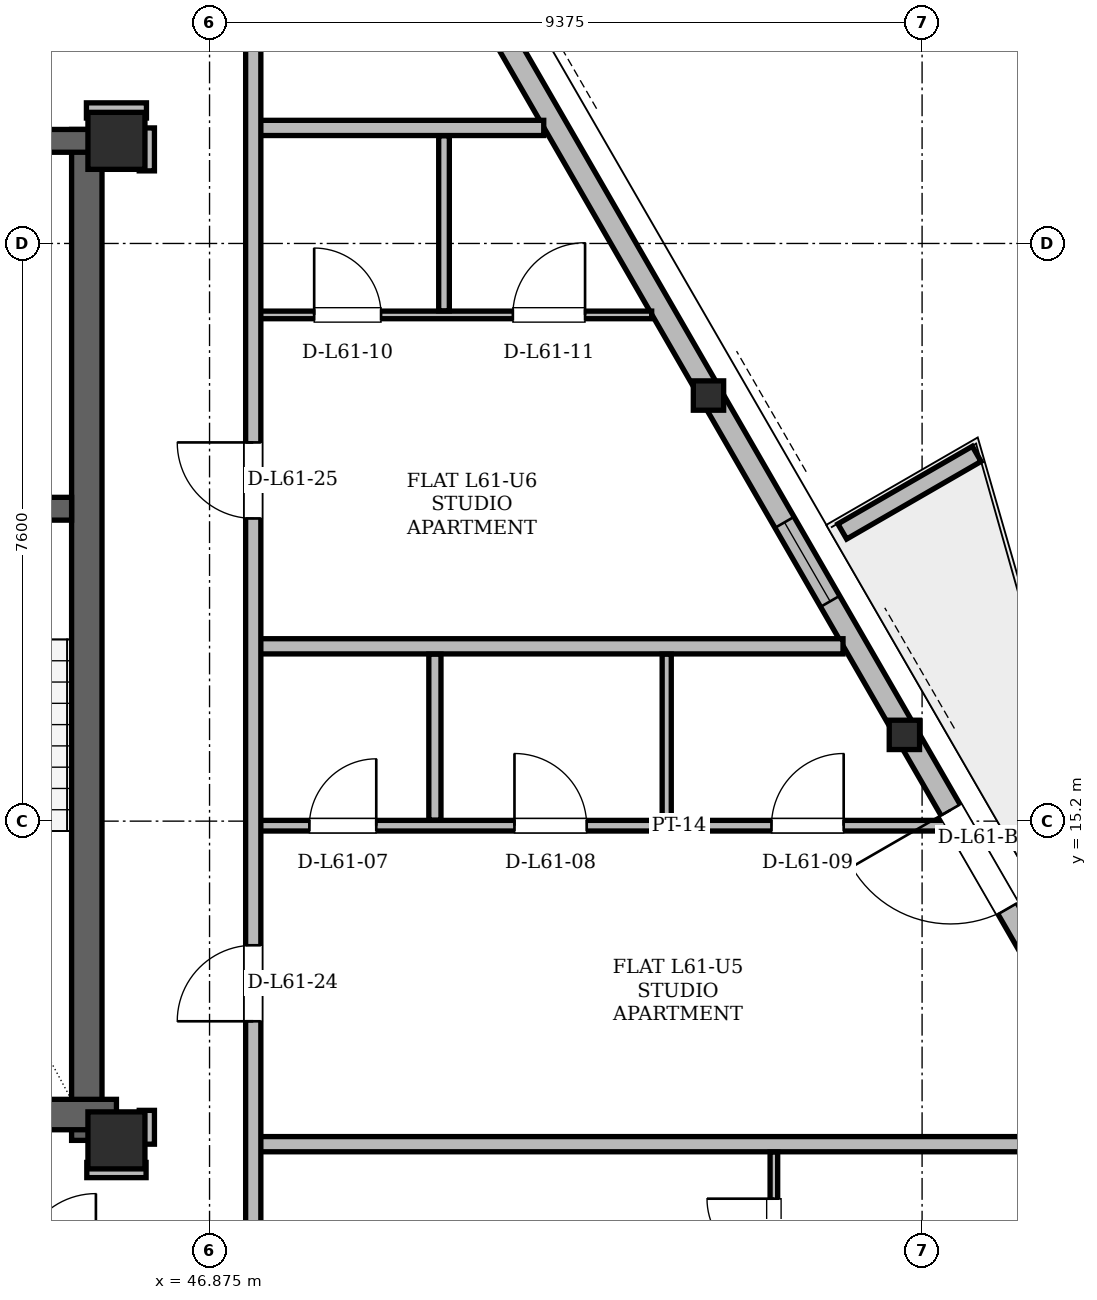
"""IFC4 building model, lengths in metres.
Left out: names, types, materials, properties, quantities, classifications, styles, units other than length and angle.
Written with IfcOpenShell. Run it as: python <this file> out.ifc"""

import sys

from ifc_helpers import new_model, si_unit, direction, frame, frame_2d, origin, origin_2d, place, context, subcontext, project, spatial, polyline, rectangle, hollow_rectangle, i_section, outline, extrude, element, fill, save


model = new_model("IFC4")
c1 = context("Model", 3, precision=1e-05, world=origin(), true_north=direction((0.0, 1.0)))
c2 = subcontext(c1, "Body", "Model", "MODEL_VIEW")
j1 = project(units=[si_unit("LENGTHUNIT", "METRE"), si_unit("PLANEANGLEUNIT", "RADIAN")], contexts=[c1])
p1 = place(None, origin())
s1 = spatial("IfcSite", under=j1, at=p1, CompositionType="ELEMENT")
p2 = place(p1, origin())
s2 = spatial("IfcBuilding", under=s1, at=p2, CompositionType="ELEMENT")
p3 = place(p2, frame((0.0, 0.0, 230.7)))
s3 = spatial("IfcBuildingStorey", under=s2, at=p3, CompositionType="ELEMENT", Elevation=230.7)
for number, where, z_axis, x_axis in (
    (1, (45.65, 11.0, 0.0), (0.0, 0.0, 1.0), (1.0, 0.0, 0.0)),
    (2, (45.65, 24.15, 0.0), (0.0, 0.0, 1.0), (1.0, 0.0, 0.0)),
):
    element("IfcColumn", number, at=place(p3, frame(where, z_axis=z_axis, x_axis=x_axis)), inside=s3, PredefinedType="COLUMN", context=c2, shape_type="SweptSolid", body=[
        extrude(hollow_rectangle(XDim=0.75, YDim=0.75, WallThickness=0.06, at=origin_2d()), origin(), (0.0, 0.0, 1.0), 3.6),
    ])
p4 = place(p3, frame((56.041, 16.359, 0.005), z_axis=(-0.012983894256, -0.013255808272, 0.999827836198), x_axis=(0.714395955768, -0.699741679752, 0.0)))
e3 = element("IfcColumn", 3, at=p4, inside=s3, PredefinedType="COLUMN", context=c2, shape_type="SweptSolid", body=[
    extrude(i_section(OverallWidth=0.399, OverallDepth=0.386, WebThickness=0.021, FlangeThickness=0.033, at=origin_2d()), origin(), (0.0, 0.0, 1.0), 3.592),
])
p5 = place(p3, frame((53.465, 20.82, 0.005), z_axis=(-0.01407165098, -0.011488449351, 0.999834988471), x_axis=(0.632422318611, -0.774623786701, 0.0)))
e4 = element("IfcColumn", 4, at=p5, inside=s3, PredefinedType="COLUMN", context=c2, shape_type="SweptSolid", body=[
    extrude(i_section(OverallWidth=0.399, OverallDepth=0.386, WebThickness=0.021, FlangeThickness=0.033, at=origin_2d()), origin(), (0.0, 0.0, 1.0), 3.591),
])
p6 = place(p3, frame((45.26, 11.0, 0.0), z_axis=(0.0, 0.0, 1.0), x_axis=(0.0, 1.0, 0.0)))
e5 = element("IfcWall", 5, at=p6, inside=s3, PredefinedType="SHEAR", context=c2, shape_type="SweptSolid", body=[
    extrude(rectangle(XDim=13.3, YDim=0.4, at=frame_2d((6.65, 0.0))), origin(), (0.0, 0.0, 1.0), 3.38),
])
p7 = place(p3, frame((38.55, 11.34, 0.0), z_axis=(0.0, 0.0, 1.0), x_axis=(1.0, 0.0, 0.0)))
e6 = element("IfcWall", 6, at=p7, inside=s3, PredefinedType="SHEAR", context=c2, shape_type="SweptSolid", body=[
    extrude(rectangle(XDim=7.1, YDim=0.4, at=frame_2d((3.55, 0.0))), origin(), (0.0, 0.0, 1.0), 3.38),
])
p8 = place(p3, frame((29.65, 24.15, 0.0), z_axis=(0.0, 0.0, 1.0), x_axis=(1.0, 0.0, 0.0)))
e7 = element("IfcWall", 7, at=p8, inside=s3, PredefinedType="SHEAR", context=c2, shape_type="SweptSolid", body=[
    extrude(rectangle(XDim=15.7, YDim=0.3, at=frame_2d((7.85, 0.0))), origin(), (0.0, 0.0, 1.0), 3.38),
])
p9 = place(p8, frame((1.7, 0.0, 0.0)))
e8 = element("IfcOpeningElement", 8, at=p9, cuts=e7, PredefinedType="OPENING", context=c2, shape_type="SweptSolid", body=[
    extrude(rectangle(XDim=1.2, YDim=2.2, at=frame_2d((0.6, 1.1))), frame((0.0, 0.15, 0.0), z_axis=(0.0, -1.0, 0.0), x_axis=(1.0, 0.0, 0.0)), (0.0, 0.0, 1.0), 0.3),
])
p10 = place(p8, frame((12.8, 0.0, 0.0)))
e9 = element("IfcOpeningElement", 9, at=p10, cuts=e7, PredefinedType="OPENING", context=c2, shape_type="SweptSolid", body=[
    extrude(rectangle(XDim=1.2, YDim=2.2, at=frame_2d((0.6, 1.1))), frame((0.0, 0.15, 0.0), z_axis=(0.0, -1.0, 0.0), x_axis=(1.0, 0.0, 0.0)), (0.0, 0.0, 1.0), 0.3),
])
p11 = place(p8, frame((6.55, 0.0, 0.0)))
e10 = element("IfcOpeningElement", 10, at=p11, cuts=e7, PredefinedType="OPENING", context=c2, shape_type="SweptSolid", body=[
    extrude(rectangle(XDim=0.9, YDim=2.05, at=frame_2d((0.45, 1.025))), frame((0.0, 0.15, 0.0), z_axis=(0.0, -1.0, 0.0), x_axis=(1.0, 0.0, 0.0)), (0.0, 0.0, 1.0), 0.3),
])
p12 = place(p8, frame((8.45, 0.0, 0.0)))
e11 = element("IfcOpeningElement", 11, at=p12, cuts=e7, PredefinedType="OPENING", context=c2, shape_type="SweptSolid", body=[
    extrude(rectangle(XDim=0.9, YDim=2.05, at=frame_2d((0.45, 1.025))), frame((0.0, 0.15, 0.0), z_axis=(0.0, -1.0, 0.0), x_axis=(1.0, 0.0, 0.0)), (0.0, 0.0, 1.0), 0.3),
])
p13 = place(p3, frame((41.05, 19.31, 0.0), z_axis=(0.0, 0.0, 1.0), x_axis=(1.0, 0.0, 0.0)))
e12 = element("IfcWall", 12, at=p13, inside=s3, PredefinedType="SHEAR", context=c2, shape_type="SweptSolid", body=[
    extrude(rectangle(XDim=4.01, YDim=0.3, at=frame_2d((2.005, 0.0))), origin(), (0.0, 0.0, 1.0), 3.38),
])
p14 = place(p13, frame((1.6, 0.0, 0.0)))
e13 = element("IfcOpeningElement", 13, at=p14, cuts=e12, PredefinedType="OPENING", context=c2, shape_type="SweptSolid", body=[
    extrude(rectangle(XDim=1.4, YDim=2.2, at=frame_2d((0.7, 1.1))), frame((0.0, 0.15, 0.0), z_axis=(0.0, -1.0, 0.0), x_axis=(1.0, 0.0, 0.0)), (0.0, 0.0, 1.0), 0.3),
])
p15 = place(p3, frame((55.898, 5.914, 0.0), z_axis=(0.0, 0.0, 1.0), x_axis=(0.49997579017, 0.866039380885, 0.0)))
e14 = element("IfcWall", 14, at=p15, inside=s3, PredefinedType="SOLIDWALL", context=c2, shape_type="SweptSolid", body=[
    extrude(rectangle(XDim=6.173, YDim=0.29, at=frame_2d((3.086, 0.0))), origin(), (0.0, 0.0, 1.0), 2.677),
])
p16 = place(p3, frame((58.984, 11.26, 0.0), z_axis=(0.0, 0.0, 1.0), x_axis=(-0.50000331183, 0.86602349169, 0.0)))
e15 = element("IfcWall", 15, at=p16, inside=s3, PredefinedType="SOLIDWALL", context=c2, shape_type="SweptSolid", body=[
    extrude(rectangle(XDim=36.795, YDim=0.29, at=frame_2d((18.397, 0.0))), origin(), (0.0, 0.0, 1.0), 2.677),
])
p17 = place(p16, frame((3.219, 0.0, 0.0)))
e16 = element("IfcOpeningElement", 16, at=p17, cuts=e15, PredefinedType="OPENING", context=c2, shape_type="SweptSolid", body=[
    extrude(rectangle(XDim=1.5, YDim=2.2, at=frame_2d((0.75, 1.1))), frame((0.0, 0.145, 0.0), z_axis=(0.0, -1.0, 0.0), x_axis=(1.0, 0.0, 0.0)), (0.0, 0.0, 1.0), 0.29),
])
p18 = place(p16, frame((27.151, 0.0, 0.0)))
e17 = element("IfcOpeningElement", 17, at=p18, cuts=e15, PredefinedType="OPENING", context=c2, shape_type="SweptSolid", body=[
    extrude(rectangle(XDim=1.3, YDim=2.2, at=frame_2d((0.65, 1.1))), frame((0.0, 0.145, 0.0), z_axis=(0.0, -1.0, 0.0), x_axis=(1.0, 0.0, 0.0)), (0.0, 0.0, 1.0), 0.29),
])
p19 = place(p16, frame((1.169, 0.0, 0.85)))
e18 = element("IfcOpeningElement", 18, at=p19, cuts=e15, PredefinedType="OPENING", context=c2, shape_type="SweptSolid", body=[
    extrude(rectangle(XDim=1.2, YDim=1.48, at=frame_2d((0.6, 0.74))), frame((0.0, 0.145, 0.0), z_axis=(0.0, -1.0, 0.0), x_axis=(1.0, 0.0, 0.0)), (0.0, 0.0, 1.0), 0.29),
])
p20 = place(p16, frame((7.888, 0.0, 0.85)))
e19 = element("IfcOpeningElement", 19, at=p20, cuts=e15, PredefinedType="OPENING", context=c2, shape_type="SweptSolid", body=[
    extrude(rectangle(XDim=1.2, YDim=1.48, at=frame_2d((0.6, 0.74))), frame((0.0, 0.145, 0.0), z_axis=(0.0, -1.0, 0.0), x_axis=(1.0, 0.0, 0.0)), (0.0, 0.0, 1.0), 0.29),
])
p21 = place(p16, frame((32.464, 0.0, 0.85)))
e20 = element("IfcOpeningElement", 20, at=p21, cuts=e15, PredefinedType="OPENING", context=c2, shape_type="SweptSolid", body=[
    extrude(rectangle(XDim=1.2, YDim=1.48, at=frame_2d((0.6, 0.74))), frame((0.0, 0.145, 0.0), z_axis=(0.0, -1.0, 0.0), x_axis=(1.0, 0.0, 0.0)), (0.0, 0.0, 1.0), 0.29),
])
p22 = place(p16, frame((16.904, 0.0, 0.85)))
e21 = element("IfcOpeningElement", 21, at=p22, cuts=e15, PredefinedType="OPENING", context=c2, shape_type="SweptSolid", body=[
    extrude(rectangle(XDim=2.0, YDim=1.717, at=frame_2d((1.0, 0.858))), frame((0.0, 0.145, 0.0), z_axis=(0.0, -1.0, 0.0), x_axis=(1.0, 0.0, 0.0)), (0.0, 0.0, 1.0), 0.29),
])
p23 = place(p16, frame((23.036, 0.0, 0.85)))
e22 = element("IfcOpeningElement", 22, at=p23, cuts=e15, PredefinedType="OPENING", context=c2, shape_type="SweptSolid", body=[
    extrude(rectangle(XDim=1.4, YDim=1.6, at=frame_2d((0.7, 0.8))), frame((0.0, 0.145, 0.0), z_axis=(0.0, -1.0, 0.0), x_axis=(1.0, 0.0, 0.0)), (0.0, 0.0, 1.0), 0.29),
])
p24 = place(p3, frame((55.2, 19.011, 0.0), z_axis=(0.0, 0.0, 1.0), x_axis=(0.866042246008, 0.499970827278, 0.0)))
e23 = element("IfcWall", 23, at=p24, inside=s3, PredefinedType="PARAPET", context=c2, shape_type="SweptSolid", body=[
    extrude(outline(polyline([(0.0, 0.0), (2.042, 0.0), (2.042, 1.1), (0.0, 1.32), (0.0, 0.0)])), frame((0.0, 0.115, 0.0), z_axis=(0.0, -1.0, 0.0), x_axis=(1.0, 0.0, 0.0)), (0.0, 0.0, 1.0), 0.23),
])
p25 = place(p3, frame((45.26, 10.61, 0.0), z_axis=(0.0, 0.0, 1.0), x_axis=(1.0, 0.0, 0.0)))
e24 = element("IfcWall", 24, at=p25, inside=s3, PredefinedType="PARTITIONING", context=c2, shape_type="SweptSolid", body=[
    extrude(rectangle(XDim=0.78, YDim=0.2, at=frame_2d((0.39, 0.0))), origin(), (0.0, 0.0, 1.0), 3.38),
])
p26 = place(p3, frame((47.45, 10.95, 0.0), z_axis=(0.0, 0.0, 1.0), x_axis=(1.0, 0.0, 0.0)))
e25 = element("IfcWall", 25, at=p26, inside=s3, PredefinedType="PARTITIONING", context=c2, shape_type="SweptSolid", body=[
    extrude(rectangle(XDim=11.148, YDim=0.2, at=frame_2d((5.574, 0.0))), origin(), (0.0, 0.0, 1.0), 2.913),
])
p27 = place(p3, frame((47.4, 15.14, 0.0), z_axis=(0.0, 0.0, 1.0), x_axis=(1.0, 0.0, 0.0)))
e26 = element("IfcWall", 26, at=p27, inside=s3, PredefinedType="PARTITIONING", context=c2, shape_type="SweptSolid", body=[
    extrude(rectangle(XDim=9.172, YDim=0.14, at=frame_2d((4.586, 0.0))), origin(), (0.0, 0.0, 1.0), 3.38),
])
p28 = place(p27, frame((0.789, 0.0, 0.0)))
e27 = element("IfcOpeningElement", 27, at=p28, cuts=e26, PredefinedType="OPENING", context=c2, shape_type="SweptSolid", body=[
    extrude(rectangle(XDim=0.88, YDim=2.08, at=frame_2d((0.44, 1.04))), frame((0.0, 0.07, 0.0), z_axis=(0.0, -1.0, 0.0), x_axis=(1.0, 0.0, 0.0)), (0.0, 0.0, 1.0), 0.14),
])
p29 = place(p27, frame((3.487, 0.0, 0.0)))
e28 = element("IfcOpeningElement", 28, at=p29, cuts=e26, PredefinedType="OPENING", context=c2, shape_type="SweptSolid", body=[
    extrude(rectangle(XDim=0.95, YDim=2.1, at=frame_2d((0.475, 1.05))), frame((0.0, 0.07, 0.0), z_axis=(0.0, -1.0, 0.0), x_axis=(1.0, 0.0, 0.0)), (0.0, 0.0, 1.0), 0.14),
])
p30 = place(p27, frame((6.868, 0.0, 0.0)))
e29 = element("IfcOpeningElement", 29, at=p30, cuts=e26, PredefinedType="OPENING", context=c2, shape_type="SweptSolid", body=[
    extrude(rectangle(XDim=0.95, YDim=2.1, at=frame_2d((0.475, 1.05))), frame((0.0, 0.07, 0.0), z_axis=(0.0, -1.0, 0.0), x_axis=(1.0, 0.0, 0.0)), (0.0, 0.0, 1.0), 0.14),
])
p31 = place(p3, frame((47.45, 17.5, 0.0), z_axis=(0.0, 0.0, 1.0), x_axis=(1.0, 0.0, 0.0)))
e30 = element("IfcWall", 30, at=p31, inside=s3, PredefinedType="PARTITIONING", context=c2, shape_type="SweptSolid", body=[
    extrude(rectangle(XDim=7.76, YDim=0.2, at=frame_2d((3.88, 0.0))), origin(), (0.0, 0.0, 1.0), 3.38),
])
p32 = place(p3, frame((47.4, 21.86, 0.0), z_axis=(0.0, 0.0, 1.0), x_axis=(1.0, 0.0, 0.0)))
e31 = element("IfcWall", 31, at=p32, inside=s3, PredefinedType="PARTITIONING", context=c2, shape_type="SweptSolid", body=[
    extrude(rectangle(XDim=5.292, YDim=0.1, at=frame_2d((2.646, 0.0))), origin(), (0.0, 0.0, 1.0), 3.38),
])
p33 = place(p32, frame((0.852, 0.0, 0.0)))
e32 = element("IfcOpeningElement", 32, at=p33, cuts=e31, PredefinedType="OPENING", context=c2, shape_type="SweptSolid", body=[
    extrude(rectangle(XDim=0.88, YDim=2.08, at=frame_2d((0.44, 1.04))), frame((0.0, 0.05, 0.0), z_axis=(0.0, -1.0, 0.0), x_axis=(1.0, 0.0, 0.0)), (0.0, 0.0, 1.0), 0.1),
])
p34 = place(p32, frame((3.466, 0.0, 0.0)))
e33 = element("IfcOpeningElement", 33, at=p34, cuts=e31, PredefinedType="OPENING", context=c2, shape_type="SweptSolid", body=[
    extrude(rectangle(XDim=0.95, YDim=2.1, at=frame_2d((0.475, 1.05))), frame((0.0, 0.05, 0.0), z_axis=(0.0, -1.0, 0.0), x_axis=(1.0, 0.0, 0.0)), (0.0, 0.0, 1.0), 0.1),
])
p35 = place(p3, frame((47.45, 24.32, 0.0), z_axis=(0.0, 0.0, 1.0), x_axis=(1.0, 0.0, 0.0)))
e34 = element("IfcWall", 34, at=p35, inside=s3, PredefinedType="PARTITIONING", context=c2, shape_type="SweptSolid", body=[
    extrude(rectangle(XDim=3.822, YDim=0.2, at=frame_2d((1.911, 0.0))), origin(), (0.0, 0.0, 1.0), 3.38),
])
p36 = place(p3, frame((45.255, 24.55, 0.0), z_axis=(0.0, 0.0, 1.0), x_axis=(1.0, 0.0, 0.0)))
e35 = element("IfcWall", 35, at=p36, inside=s3, PredefinedType="PARTITIONING", context=c2, shape_type="SweptSolid", body=[
    extrude(rectangle(XDim=0.79, YDim=0.2, at=frame_2d((0.395, 0.0))), origin(), (0.0, 0.0, 1.0), 2.913),
])
p37 = place(p3, frame((46.05, 10.95, 0.0), z_axis=(0.0, 0.0, 1.0), x_axis=(0.0, 1.0, 0.0)))
e36 = element("IfcWall", 36, at=p37, inside=s3, PredefinedType="PARTITIONING", context=c2, shape_type="SweptSolid", body=[
    extrude(rectangle(XDim=0.445, YDim=0.2, at=frame_2d((0.223, 0.0))), origin(), (0.0, 0.0, 1.0), 2.913),
])
p38 = place(p3, frame((46.05, 23.755, 0.0), z_axis=(0.0, 0.0, 1.0), x_axis=(0.0, 1.0, 0.0)))
e37 = element("IfcWall", 37, at=p38, inside=s3, PredefinedType="PARTITIONING", context=c2, shape_type="SweptSolid", body=[
    extrude(rectangle(XDim=0.565, YDim=0.2, at=frame_2d((0.283, 0.0))), origin(), (0.0, 0.0, 1.0), 3.38),
])
p39 = place(p3, frame((47.45, 9.404, 0.0), z_axis=(0.0, 0.0, 1.0), x_axis=(0.0, 1.0, 0.0)))
e38 = element("IfcWall", 38, at=p39, inside=s3, PredefinedType="PARTITIONING", context=c2, shape_type="SweptSolid", body=[
    extrude(rectangle(XDim=16.462, YDim=0.2, at=frame_2d((8.231, 0.0))), origin(), (0.0, 0.0, 1.0), 2.913),
])
p40 = place(p39, frame((3.163, 0.0, 0.0)))
e39 = element("IfcOpeningElement", 39, at=p40, cuts=e38, PredefinedType="OPENING", context=c2, shape_type="SweptSolid", body=[
    extrude(rectangle(XDim=1.0, YDim=2.18, at=frame_2d((0.5, 1.09))), frame((0.0, 0.1, 0.0), z_axis=(0.0, -1.0, 0.0), x_axis=(1.0, 0.0, 0.0)), (0.0, 0.0, 1.0), 0.2),
])
p41 = place(p39, frame((9.778, 0.0, 0.0)))
e40 = element("IfcOpeningElement", 40, at=p41, cuts=e38, PredefinedType="OPENING", context=c2, shape_type="SweptSolid", body=[
    extrude(rectangle(XDim=1.0, YDim=2.18, at=frame_2d((0.5, 1.09))), frame((0.0, 0.1, 0.0), z_axis=(0.0, -1.0, 0.0), x_axis=(1.0, 0.0, 0.0)), (0.0, 0.0, 1.0), 0.2),
])
p42 = place(p3, frame((49.84, 15.214, 0.0), z_axis=(0.0, 0.0, 1.0), x_axis=(0.0, 1.0, 0.0)))
e41 = element("IfcWall", 41, at=p42, inside=s3, PredefinedType="PARTITIONING", context=c2, shape_type="SweptSolid", body=[
    extrude(rectangle(XDim=2.182, YDim=0.16, at=frame_2d((1.091, 0.0))), origin(), (0.0, 0.0, 1.0), 3.38),
])
p43 = place(p3, frame((49.96, 21.914, 0.0), z_axis=(0.0, 0.0, 1.0), x_axis=(0.0, 1.0, 0.0)))
e42 = element("IfcWall", 42, at=p43, inside=s3, PredefinedType="PARTITIONING", context=c2, shape_type="SweptSolid", body=[
    extrude(rectangle(XDim=2.302, YDim=0.14, at=frame_2d((1.151, 0.0))), origin(), (0.0, 0.0, 1.0), 3.38),
])
p44 = place(p3, frame((52.89, 15.214, 0.0), z_axis=(0.0, 0.0, 1.0), x_axis=(0.0, 1.0, 0.0)))
e43 = element("IfcWall", 43, at=p44, inside=s3, PredefinedType="PARTITIONING", context=c2, shape_type="SweptSolid", body=[
    extrude(rectangle(XDim=2.182, YDim=0.12, at=frame_2d((1.091, 0.0))), origin(), (0.0, 0.0, 1.0), 3.38),
])
p45 = place(p3, frame((54.3, 6.063, 0.0), z_axis=(0.0, 0.0, 1.0), x_axis=(0.0, 1.0, 0.0)))
e44 = element("IfcWall", 44, at=p45, inside=s3, PredefinedType="PARTITIONING", context=c2, shape_type="SweptSolid", body=[
    extrude(rectangle(XDim=4.783, YDim=0.1, at=frame_2d((2.392, 0.0))), origin(), (0.0, 0.0, 1.0), 2.913),
])
p46 = place(p45, frame((0.782, 0.0, 0.0)))
e45 = element("IfcOpeningElement", 45, at=p46, cuts=e44, PredefinedType="OPENING", context=c2, shape_type="SweptSolid", body=[
    extrude(rectangle(XDim=0.95, YDim=2.1, at=frame_2d((0.475, 1.05))), frame((0.0, 0.05, 0.0), z_axis=(0.0, -1.0, 0.0), x_axis=(1.0, 0.0, 0.0)), (0.0, 0.0, 1.0), 0.1),
])
p47 = place(p45, frame((3.29, 0.0, 0.0)))
e46 = element("IfcOpeningElement", 46, at=p47, cuts=e44, PredefinedType="OPENING", context=c2, shape_type="SweptSolid", body=[
    extrude(rectangle(XDim=0.88, YDim=2.08, at=frame_2d((0.44, 1.04))), frame((0.0, 0.05, 0.0), z_axis=(0.0, -1.0, 0.0), x_axis=(1.0, 0.0, 0.0)), (0.0, 0.0, 1.0), 0.1),
])
p48 = place(p17, origin())
e47 = element("IfcDoor", 47, at=p48, inside=s3, OperationType="SINGLE_SWING_RIGHT", PredefinedType="DOOR", context=c2, shape_type="SweptSolid", body=[
    extrude(rectangle(XDim=1.5, YDim=2.2, at=frame_2d((0.75, 1.1))), frame((0.0, 0.025, 0.0), z_axis=(0.0, -1.0, 0.0), x_axis=(1.0, 0.0, 0.0)), (0.0, 0.0, 1.0), 0.05),
])
fill(e16, e47)
p49 = place(p20, origin())
e48 = element("IfcWindow", 48, at=p49, inside=s3, PartitioningType="SINGLE_PANEL", PredefinedType="WINDOW", context=c2, shape_type="SweptSolid", body=[
    extrude(rectangle(XDim=1.2, YDim=1.48, at=frame_2d((0.6, 0.74))), frame((0.0, 0.03, 0.0), z_axis=(0.0, -1.0, 0.0), x_axis=(1.0, 0.0, 0.0)), (0.0, 0.0, 1.0), 0.06),
])
fill(e19, e48)
p50 = place(p28, origin())
e49 = element("IfcDoor", 49, at=p50, inside=s3, OperationType="SINGLE_SWING_RIGHT", PredefinedType="DOOR", context=c2, shape_type="SweptSolid", body=[
    extrude(rectangle(XDim=0.88, YDim=2.08, at=frame_2d((0.44, 1.04))), frame((0.0, 0.025, 0.0), z_axis=(0.0, -1.0, 0.0), x_axis=(1.0, 0.0, 0.0)), (0.0, 0.0, 1.0), 0.05),
])
fill(e27, e49)
p51 = place(p29, origin())
e50 = element("IfcDoor", 50, at=p51, inside=s3, OperationType="SINGLE_SWING_LEFT", PredefinedType="DOOR", context=c2, shape_type="SweptSolid", body=[
    extrude(rectangle(XDim=0.95, YDim=2.1, at=frame_2d((0.475, 1.05))), frame((0.0, 0.025, 0.0), z_axis=(0.0, -1.0, 0.0), x_axis=(1.0, 0.0, 0.0)), (0.0, 0.0, 1.0), 0.05),
])
fill(e28, e50)
p52 = place(p30, origin())
e51 = element("IfcDoor", 51, at=p52, inside=s3, OperationType="SINGLE_SWING_RIGHT", PredefinedType="DOOR", context=c2, shape_type="SweptSolid", body=[
    extrude(rectangle(XDim=0.95, YDim=2.1, at=frame_2d((0.475, 1.05))), frame((0.0, 0.025, 0.0), z_axis=(0.0, -1.0, 0.0), x_axis=(1.0, 0.0, 0.0)), (0.0, 0.0, 1.0), 0.05),
])
fill(e29, e51)
p53 = place(p33, origin())
e52 = element("IfcDoor", 52, at=p53, inside=s3, OperationType="SINGLE_SWING_LEFT", PredefinedType="DOOR", context=c2, shape_type="SweptSolid", body=[
    extrude(rectangle(XDim=0.88, YDim=2.08, at=frame_2d((0.44, 1.04))), frame((0.0, 0.025, 0.0), z_axis=(0.0, -1.0, 0.0), x_axis=(1.0, 0.0, 0.0)), (0.0, 0.0, 1.0), 0.05),
])
fill(e32, e52)
p54 = place(p34, origin())
e53 = element("IfcDoor", 53, at=p54, inside=s3, OperationType="SINGLE_SWING_RIGHT", PredefinedType="DOOR", context=c2, shape_type="SweptSolid", body=[
    extrude(rectangle(XDim=0.95, YDim=2.1, at=frame_2d((0.475, 1.05))), frame((0.0, 0.025, 0.0), z_axis=(0.0, -1.0, 0.0), x_axis=(1.0, 0.0, 0.0)), (0.0, 0.0, 1.0), 0.05),
])
fill(e33, e53)
p55 = place(p40, origin())
e54 = element("IfcDoor", 54, at=p55, inside=s3, OperationType="SINGLE_SWING_LEFT", PredefinedType="DOOR", context=c2, shape_type="SweptSolid", body=[
    extrude(rectangle(XDim=1.0, YDim=2.18, at=frame_2d((0.5, 1.09))), frame((0.0, 0.025, 0.0), z_axis=(0.0, -1.0, 0.0), x_axis=(1.0, 0.0, 0.0)), (0.0, 0.0, 1.0), 0.05),
])
fill(e39, e54)
p56 = place(p41, origin())
e55 = element("IfcDoor", 55, at=p56, inside=s3, OperationType="SINGLE_SWING_RIGHT", PredefinedType="DOOR", context=c2, shape_type="SweptSolid", body=[
    extrude(rectangle(XDim=1.0, YDim=2.18, at=frame_2d((0.5, 1.09))), frame((0.0, 0.025, 0.0), z_axis=(0.0, -1.0, 0.0), x_axis=(1.0, 0.0, 0.0)), (0.0, 0.0, 1.0), 0.05),
])
fill(e40, e55)
p57 = place(p47, origin())
e56 = element("IfcDoor", 56, at=p57, inside=s3, OperationType="SINGLE_SWING_RIGHT", PredefinedType="DOOR", context=c2, shape_type="SweptSolid", body=[
    extrude(rectangle(XDim=0.88, YDim=2.08, at=frame_2d((0.44, 1.04))), frame((0.0, 0.025, 0.0), z_axis=(0.0, -1.0, 0.0), x_axis=(1.0, 0.0, 0.0)), (0.0, 0.0, 1.0), 0.05),
])
fill(e46, e56)
save(model, sys.argv[1])
